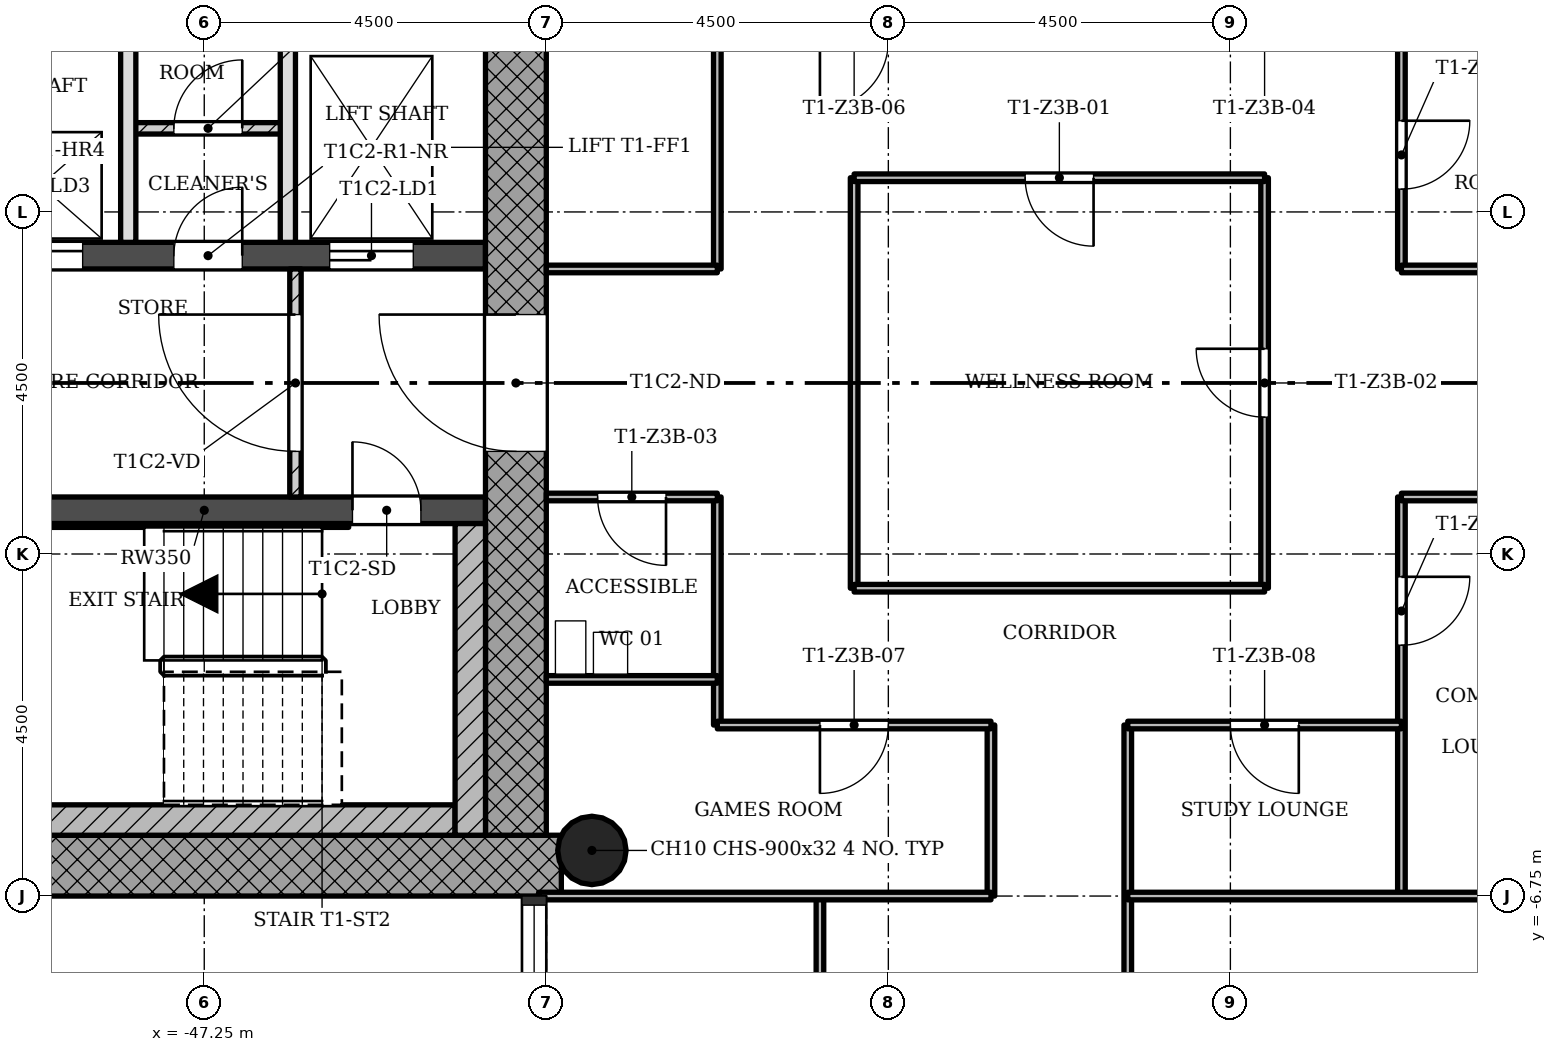
"""IFC4 building model, lengths in metres.
Left out: names, types, materials, properties, quantities, classifications, styles, units other than length and angle.
Written with IfcOpenShell. Run it as: python <this file> out.ifc"""

import sys

from ifc_helpers import new_model, si_unit, direction, frame, frame_2d, origin, origin_2d, place, context, subcontext, project, spatial, rectangle, hollow_circle, extrude, element, fill, save


model = new_model("IFC4")
c1 = context("Model", 3, precision=1e-05, world=origin(), true_north=direction((0.0, 1.0)))
c2 = subcontext(c1, "Body", "Model", "MODEL_VIEW")
j1 = project(units=[si_unit("LENGTHUNIT", "METRE"), si_unit("PLANEANGLEUNIT", "RADIAN")], contexts=[c1])
p1 = place(None, origin())
s1 = spatial("IfcSite", under=j1, at=p1, CompositionType="ELEMENT")
p2 = place(p1, origin())
s2 = spatial("IfcBuilding", under=s1, at=p2, CompositionType="ELEMENT")
p3 = place(p2, frame((0.0, 0.0, 143.9)))
s3 = spatial("IfcBuildingStorey", under=s2, at=p3, CompositionType="ELEMENT", Elevation=143.9)
p4 = place(p3, frame((-50.95, -6.35, 0.0), z_axis=(0.0, 0.0, 1.0), x_axis=(1.0, 0.0, 0.0)))
e1 = element("IfcWall", 1, at=p4, inside=s3, PredefinedType="SHEAR", context=c2, shape_type="SweptSolid", body=[
    extrude(rectangle(XDim=8.398, YDim=0.8, at=frame_2d((4.199, 0.0))), origin(), (0.0, 0.0, 1.0), 3.4),
])
p5 = place(p3, frame((-43.15, -5.95, 0.0), z_axis=(0.0, 0.0, 1.0), x_axis=(0.0, 1.0, 0.0)))
e2 = element("IfcWall", 2, at=p5, inside=s3, PredefinedType="SHEAR", context=c2, shape_type="SweptSolid", body=[
    extrude(rectangle(XDim=12.7, YDim=0.8, at=frame_2d((6.35, 0.0))), origin(), (0.0, 0.0, 1.0), 3.4),
])
p6 = place(p5, frame((5.05, 0.0, 0.0)))
e3 = element("IfcOpeningElement", 3, at=p6, cuts=e2, PredefinedType="OPENING", context=c2, shape_type="SweptSolid", body=[
    extrude(rectangle(XDim=1.8, YDim=2.1, at=frame_2d((0.9, 1.05))), frame((0.0, 0.41, 0.0), z_axis=(0.0, -1.0, 0.0), x_axis=(1.0, 0.0, 0.0)), (0.0, 0.0, 1.0), 0.82),
])
p7 = place(p3, frame((-50.95, -1.675, 0.0), z_axis=(0.0, 0.0, 1.0), x_axis=(1.0, 0.0, 0.0)))
e4 = element("IfcWall", 4, at=p7, inside=s3, PredefinedType="SHEAR", context=c2, shape_type="SweptSolid", body=[
    extrude(rectangle(XDim=7.4, YDim=0.35, at=frame_2d((3.7, 0.0))), origin(), (0.0, 0.0, 1.0), 3.4),
])
p8 = place(p7, frame((5.65, 0.0, 0.0)))
e5 = element("IfcOpeningElement", 5, at=p8, cuts=e4, PredefinedType="OPENING", context=c2, shape_type="SweptSolid", body=[
    extrude(rectangle(XDim=0.9, YDim=2.1, at=frame_2d((0.45, 1.05))), frame((0.0, 0.185, 0.0), z_axis=(0.0, -1.0, 0.0), x_axis=(1.0, 0.0, 0.0)), (0.0, 0.0, 1.0), 0.37),
])
p9 = place(p3, frame((-50.95, 1.675, 0.0), z_axis=(0.0, 0.0, 1.0), x_axis=(1.0, 0.0, 0.0)))
e6 = element("IfcWall", 6, at=p9, inside=s3, PredefinedType="SHEAR", context=c2, shape_type="SweptSolid", body=[
    extrude(rectangle(XDim=7.4, YDim=0.35, at=frame_2d((3.7, 0.0))), origin(), (0.0, 0.0, 1.0), 3.4),
])
p10 = place(p9, frame((5.35, 0.0, 0.0)))
e7 = element("IfcOpeningElement", 7, at=p10, cuts=e6, PredefinedType="OPENING", context=c2, shape_type="SweptSolid", body=[
    extrude(rectangle(XDim=1.1, YDim=2.1, at=frame_2d((0.55, 1.05))), frame((0.0, 0.185, 0.0), z_axis=(0.0, -1.0, 0.0), x_axis=(1.0, 0.0, 0.0)), (0.0, 0.0, 1.0), 0.37),
])
p11 = place(p9, frame((1.0, 0.0, 0.0)))
e8 = element("IfcOpeningElement", 8, at=p11, cuts=e6, PredefinedType="OPENING", context=c2, shape_type="SweptSolid", body=[
    extrude(rectangle(XDim=1.1, YDim=2.1, at=frame_2d((0.55, 1.05))), frame((0.0, 0.185, 0.0), z_axis=(0.0, -1.0, 0.0), x_axis=(1.0, 0.0, 0.0)), (0.0, 0.0, 1.0), 0.37),
])
p12 = place(p9, frame((3.3, 0.0, 0.0)))
e9 = element("IfcOpeningElement", 9, at=p12, cuts=e6, PredefinedType="OPENING", context=c2, shape_type="SweptSolid", body=[
    extrude(rectangle(XDim=0.9, YDim=2.1, at=frame_2d((0.45, 1.05))), frame((0.0, 0.185, 0.0), z_axis=(0.0, -1.0, 0.0), x_axis=(1.0, 0.0, 0.0)), (0.0, 0.0, 1.0), 0.37),
])
p13 = place(p3, frame((-42.15, -6.15, 0.0), z_axis=(0.0, 0.0, 1.0), x_axis=(1.0, 0.0, 0.0)))
e10 = element("IfcColumn", 10, at=p13, inside=s3, PredefinedType="COLUMN", context=c2, shape_type="SweptSolid", body=[
    extrude(hollow_circle(Radius=0.45, WallThickness=0.032, at=origin_2d()), origin(), (0.0, 0.0, 1.0), 3.4),
])
p14 = place(p3, frame((-46.05, 1.5, 0.0), z_axis=(0.0, 0.0, 1.0), x_axis=(0.0, -1.0, 0.0)))
e11 = element("IfcWall", 11, at=p14, inside=s3, PredefinedType="PARTITIONING", context=c2, shape_type="SweptSolid", body=[
    extrude(rectangle(XDim=3.0, YDim=0.15, at=frame_2d((1.5, 0.0))), origin(), (0.0, 0.0, 1.0), 3.0),
])
p15 = place(p14, frame((0.6, 0.0, 0.0)))
e12 = element("IfcOpeningElement", 12, at=p15, cuts=e11, PredefinedType="OPENING", context=c2, shape_type="SweptSolid", body=[
    extrude(rectangle(XDim=1.8, YDim=2.1, at=frame_2d((0.9, 1.05))), frame((0.0, 0.085, 0.0), z_axis=(0.0, -1.0, 0.0), x_axis=(1.0, 0.0, 0.0)), (0.0, 0.0, 1.0), 0.17),
])
for number, where, z_axis, x_axis in (
    (13, (-48.25, 5.95, 0.0), (0.0, 0.0, 1.0), (0.0, -1.0, 0.0)),
    (14, (-46.15, 5.95, 0.0), (0.0, 0.0, 1.0), (0.0, -1.0, 0.0)),
):
    element("IfcWall", number, at=place(p3, frame(where, z_axis=z_axis, x_axis=x_axis)), inside=s3, PredefinedType="SOLIDWALL", context=c2, shape_type="SweptSolid", body=[
        extrude(rectangle(XDim=4.1, YDim=0.2, at=frame_2d((2.05, 0.0))), origin(), (0.0, 0.0, 1.0), 3.0),
    ])
p16 = place(p3, frame((-46.15, 3.35, 0.0), z_axis=(0.0, 0.0, 1.0), x_axis=(-1.0, 0.0, 0.0)))
e15 = element("IfcWall", 15, at=p16, inside=s3, PredefinedType="PARTITIONING", context=c2, shape_type="SweptSolid", body=[
    extrude(rectangle(XDim=2.1, YDim=0.15, at=frame_2d((1.05, 0.0))), origin(), (0.0, 0.0, 1.0), 3.0),
])
p17 = place(p16, frame((0.6, 0.0, 0.0)))
e16 = element("IfcOpeningElement", 16, at=p17, cuts=e15, PredefinedType="OPENING", context=c2, shape_type="SweptSolid", body=[
    extrude(rectangle(XDim=0.9, YDim=2.1, at=frame_2d((0.45, 1.05))), frame((0.0, 0.085, 0.0), z_axis=(0.0, -1.0, 0.0), x_axis=(1.0, 0.0, 0.0)), (0.0, 0.0, 1.0), 0.17),
])
for number, where, z_axis, x_axis in (
    (17, (-40.5, -4.5, 0.0), (0.0, 0.0, 1.0), (0.0, 1.0, 0.0)),
    (18, (-40.5, 1.5, 0.0), (0.0, 0.0, 1.0), (0.0, 1.0, 0.0)),
):
    element("IfcWall", number, at=place(p3, frame(where, z_axis=z_axis, x_axis=x_axis)), inside=s3, PredefinedType="PARTITIONING", context=c2, shape_type="SweptSolid", body=[
        extrude(rectangle(XDim=3.0, YDim=0.1, at=frame_2d((1.5, 0.0))), origin(), (0.0, 0.0, 1.0), 3.0),
    ])
p18 = place(p3, frame((-39.15, -15.75, 0.0), z_axis=(0.0, 0.0, 1.0), x_axis=(0.0, 1.0, 0.0)))
e19 = element("IfcWall", 19, at=p18, inside=s3, PredefinedType="PARTITIONING", context=c2, shape_type="SweptSolid", body=[
    extrude(rectangle(XDim=9.0, YDim=0.1, at=frame_2d((4.5, 0.0))), origin(), (0.0, 0.0, 1.0), 3.0),
])
p19 = place(p18, frame((5.55, 0.0, 0.0)))
e20 = element("IfcOpeningElement", 20, at=p19, cuts=e19, PredefinedType="OPENING", context=c2, shape_type="SweptSolid", body=[
    extrude(rectangle(XDim=0.9, YDim=2.1, at=frame_2d((0.45, 1.05))), frame((0.0, 0.06, 0.0), z_axis=(0.0, -1.0, 0.0), x_axis=(1.0, 0.0, 0.0)), (0.0, 0.0, 1.0), 0.12),
])
p20 = place(p3, frame((-38.7, -2.7, 0.0), z_axis=(0.0, 0.0, 1.0), x_axis=(0.0, 1.0, 0.0)))
e21 = element("IfcWall", 21, at=p20, inside=s3, PredefinedType="PARTITIONING", context=c2, shape_type="SweptSolid", body=[
    extrude(rectangle(XDim=5.4, YDim=0.1, at=frame_2d((2.7, 0.0))), origin(), (0.0, 0.0, 1.0), 3.0),
])
p21 = place(p3, frame((-36.9, -6.75, 0.0), z_axis=(0.0, 0.0, 1.0), x_axis=(0.0, 1.0, 0.0)))
e22 = element("IfcWall", 22, at=p21, inside=s3, PredefinedType="PARTITIONING", context=c2, shape_type="SweptSolid", body=[
    extrude(rectangle(XDim=2.25, YDim=0.1, at=frame_2d((1.125, 0.0))), origin(), (0.0, 0.0, 1.0), 3.0),
])
p22 = place(p3, frame((-35.1, -8.55, 0.0), z_axis=(0.0, 0.0, 1.0), x_axis=(0.0, 1.0, 0.0)))
e23 = element("IfcWall", 23, at=p22, inside=s3, PredefinedType="PARTITIONING", context=c2, shape_type="SweptSolid", body=[
    extrude(rectangle(XDim=4.05, YDim=0.1, at=frame_2d((2.025, 0.0))), origin(), (0.0, 0.0, 1.0), 3.0),
])
p23 = place(p3, frame((-33.3, -2.7, 0.0), z_axis=(0.0, 0.0, 1.0), x_axis=(0.0, 1.0, 0.0)))
e24 = element("IfcWall", 24, at=p23, inside=s3, PredefinedType="PARTITIONING", context=c2, shape_type="SweptSolid", body=[
    extrude(rectangle(XDim=5.4, YDim=0.1, at=frame_2d((2.7, 0.0))), origin(), (0.0, 0.0, 1.0), 3.0),
])
p24 = place(p23, frame((2.25, 0.0, 0.0)))
e25 = element("IfcOpeningElement", 25, at=p24, cuts=e24, PredefinedType="OPENING", context=c2, shape_type="SweptSolid", body=[
    extrude(rectangle(XDim=0.9, YDim=2.1, at=frame_2d((0.45, 1.05))), frame((0.0, 0.06, 0.0), z_axis=(0.0, -1.0, 0.0), x_axis=(1.0, 0.0, 0.0)), (0.0, 0.0, 1.0), 0.12),
])
p25 = place(p3, frame((-31.5, -6.75, 0.0), z_axis=(0.0, 0.0, 1.0), x_axis=(0.0, 1.0, 0.0)))
e26 = element("IfcWall", 26, at=p25, inside=s3, PredefinedType="PARTITIONING", context=c2, shape_type="SweptSolid", body=[
    extrude(rectangle(XDim=5.25, YDim=0.1, at=frame_2d((2.625, 0.0))), origin(), (0.0, 0.0, 1.0), 3.0),
])
p26 = place(p25, frame((3.3, 0.0, 0.0)))
e27 = element("IfcOpeningElement", 27, at=p26, cuts=e26, PredefinedType="OPENING", context=c2, shape_type="SweptSolid", body=[
    extrude(rectangle(XDim=0.9, YDim=2.1, at=frame_2d((0.45, 1.05))), frame((0.0, 0.06, 0.0), z_axis=(0.0, -1.0, 0.0), x_axis=(1.0, 0.0, 0.0)), (0.0, 0.0, 1.0), 0.12),
])
p27 = place(p3, frame((-31.5, 1.5, 0.0), z_axis=(0.0, 0.0, 1.0), x_axis=(0.0, 1.0, 0.0)))
e28 = element("IfcWall", 28, at=p27, inside=s3, PredefinedType="PARTITIONING", context=c2, shape_type="SweptSolid", body=[
    extrude(rectangle(XDim=3.0, YDim=0.1, at=frame_2d((1.5, 0.0))), origin(), (0.0, 0.0, 1.0), 3.0),
])
p28 = place(p27, frame((1.05, 0.0, 0.0)))
e29 = element("IfcOpeningElement", 29, at=p28, cuts=e28, PredefinedType="OPENING", context=c2, shape_type="SweptSolid", body=[
    extrude(rectangle(XDim=0.9, YDim=2.1, at=frame_2d((0.45, 1.05))), frame((0.0, 0.06, 0.0), z_axis=(0.0, -1.0, 0.0), x_axis=(1.0, 0.0, 0.0)), (0.0, 0.0, 1.0), 0.12),
])
for number, where, z_axis, x_axis in (
    (30, (-42.85, -6.75, 0.0), (0.0, 0.0, 1.0), (1.0, 0.0, 0.0)),
    (31, (-35.1, -6.75, 0.0), (0.0, 0.0, 1.0), (1.0, 0.0, 0.0)),
):
    element("IfcWall", number, at=place(p3, frame(where, z_axis=z_axis, x_axis=x_axis)), inside=s3, PredefinedType="PARTITIONING", context=c2, shape_type="SweptSolid", body=[
        extrude(rectangle(XDim=5.95, YDim=0.1, at=frame_2d((2.975, 0.0))), origin(), (0.0, 0.0, 1.0), 3.0),
    ])
p29 = place(p3, frame((-40.5, -4.5, 0.0), z_axis=(0.0, 0.0, 1.0), x_axis=(1.0, 0.0, 0.0)))
e32 = element("IfcWall", 32, at=p29, inside=s3, PredefinedType="PARTITIONING", context=c2, shape_type="SweptSolid", body=[
    extrude(rectangle(XDim=3.6, YDim=0.1, at=frame_2d((1.8, 0.0))), origin(), (0.0, 0.0, 1.0), 3.0),
])
p30 = place(p29, frame((1.35, 0.0, 0.0)))
e33 = element("IfcOpeningElement", 33, at=p30, cuts=e32, PredefinedType="OPENING", context=c2, shape_type="SweptSolid", body=[
    extrude(rectangle(XDim=0.9, YDim=2.1, at=frame_2d((0.45, 1.05))), frame((0.0, 0.06, 0.0), z_axis=(0.0, -1.0, 0.0), x_axis=(1.0, 0.0, 0.0)), (0.0, 0.0, 1.0), 0.12),
])
p31 = place(p3, frame((-35.1, -4.5, 0.0), z_axis=(0.0, 0.0, 1.0), x_axis=(1.0, 0.0, 0.0)))
e34 = element("IfcWall", 34, at=p31, inside=s3, PredefinedType="PARTITIONING", context=c2, shape_type="SweptSolid", body=[
    extrude(rectangle(XDim=3.6, YDim=0.1, at=frame_2d((1.8, 0.0))), origin(), (0.0, 0.0, 1.0), 3.0),
])
p32 = place(p31, frame((1.35, 0.0, 0.0)))
e35 = element("IfcOpeningElement", 35, at=p32, cuts=e34, PredefinedType="OPENING", context=c2, shape_type="SweptSolid", body=[
    extrude(rectangle(XDim=0.9, YDim=2.1, at=frame_2d((0.45, 1.05))), frame((0.0, 0.06, 0.0), z_axis=(0.0, -1.0, 0.0), x_axis=(1.0, 0.0, 0.0)), (0.0, 0.0, 1.0), 0.12),
])
p33 = place(p3, frame((-42.75, -3.9, 0.0), z_axis=(0.0, 0.0, 1.0), x_axis=(1.0, 0.0, 0.0)))
e36 = element("IfcWall", 36, at=p33, inside=s3, PredefinedType="PARTITIONING", context=c2, shape_type="SweptSolid", body=[
    extrude(rectangle(XDim=2.25, YDim=0.1, at=frame_2d((1.125, 0.0))), origin(), (0.0, 0.0, 1.0), 3.0),
])
p34 = place(p3, frame((-38.7, -2.7, 0.0), z_axis=(0.0, 0.0, 1.0), x_axis=(1.0, 0.0, 0.0)))
e37 = element("IfcWall", 37, at=p34, inside=s3, PredefinedType="PARTITIONING", context=c2, shape_type="SweptSolid", body=[
    extrude(rectangle(XDim=5.4, YDim=0.1, at=frame_2d((2.7, 0.0))), origin(), (0.0, 0.0, 1.0), 3.0),
])
p35 = place(p3, frame((-42.75, -1.5, 0.0), z_axis=(0.0, 0.0, 1.0), x_axis=(1.0, 0.0, 0.0)))
e38 = element("IfcWall", 38, at=p35, inside=s3, PredefinedType="PARTITIONING", context=c2, shape_type="SweptSolid", body=[
    extrude(rectangle(XDim=2.25, YDim=0.1, at=frame_2d((1.125, 0.0))), origin(), (0.0, 0.0, 1.0), 3.0),
])
p36 = place(p35, frame((0.675, 0.0, 0.0)))
e39 = element("IfcOpeningElement", 39, at=p36, cuts=e38, PredefinedType="OPENING", context=c2, shape_type="SweptSolid", body=[
    extrude(rectangle(XDim=0.9, YDim=2.1, at=frame_2d((0.45, 1.05))), frame((0.0, 0.06, 0.0), z_axis=(0.0, -1.0, 0.0), x_axis=(1.0, 0.0, 0.0)), (0.0, 0.0, 1.0), 0.12),
])
for number, where, z_axis, x_axis in (
    (40, (-31.5, -1.5, 0.0), (0.0, 0.0, 1.0), (1.0, 0.0, 0.0)),
    (41, (-42.75, 1.5, 0.0), (0.0, 0.0, 1.0), (1.0, 0.0, 0.0)),
    (42, (-31.5, 1.5, 0.0), (0.0, 0.0, 1.0), (1.0, 0.0, 0.0)),
):
    element("IfcWall", number, at=place(p3, frame(where, z_axis=z_axis, x_axis=x_axis)), inside=s3, PredefinedType="PARTITIONING", context=c2, shape_type="SweptSolid", body=[
        extrude(rectangle(XDim=2.25, YDim=0.1, at=frame_2d((1.125, 0.0))), origin(), (0.0, 0.0, 1.0), 3.0),
    ])
p37 = place(p3, frame((-38.7, 2.7, 0.0), z_axis=(0.0, 0.0, 1.0), x_axis=(1.0, 0.0, 0.0)))
e43 = element("IfcWall", 43, at=p37, inside=s3, PredefinedType="PARTITIONING", context=c2, shape_type="SweptSolid", body=[
    extrude(rectangle(XDim=5.4, YDim=0.1, at=frame_2d((2.7, 0.0))), origin(), (0.0, 0.0, 1.0), 3.0),
])
p38 = place(p37, frame((2.25, 0.0, 0.0)))
e44 = element("IfcOpeningElement", 44, at=p38, cuts=e43, PredefinedType="OPENING", context=c2, shape_type="SweptSolid", body=[
    extrude(rectangle(XDim=0.9, YDim=2.1, at=frame_2d((0.45, 1.05))), frame((0.0, 0.06, 0.0), z_axis=(0.0, -1.0, 0.0), x_axis=(1.0, 0.0, 0.0)), (0.0, 0.0, 1.0), 0.12),
])
p39 = place(p3, frame((-43.95, -5.75, 0.0), z_axis=(0.0, 0.0, 1.0), x_axis=(-1.0, 0.0, 0.0)))
e45 = element("IfcWall", 45, at=p39, inside=s3, PredefinedType="SHEAR", context=c2, shape_type="SweptSolid", body=[
    extrude(rectangle(XDim=6.6, YDim=0.4, at=frame_2d((3.3, 0.0))), origin(), (0.0, 0.0, 1.0), 3.4),
])
p40 = place(p3, frame((-43.75, -1.85, 0.0), z_axis=(0.0, 0.0, 1.0), x_axis=(0.0, -1.0, 0.0)))
e46 = element("IfcWall", 46, at=p40, inside=s3, PredefinedType="SHEAR", context=c2, shape_type="SweptSolid", body=[
    extrude(rectangle(XDim=4.1, YDim=0.4, at=frame_2d((2.05, 0.0))), origin(), (0.0, 0.0, 1.0), 3.4),
])
p41 = place(p3, frame((-45.35, -1.875, 0.0), z_axis=(0.0, 0.0, 1.0), x_axis=(-1.0, 0.0, 0.0)))
e47 = element("IfcWall", 47, at=p41, inside=s3, PredefinedType="SHEAR", context=c2, shape_type="SweptSolid", body=[
    extrude(rectangle(XDim=5.2, YDim=0.05, at=frame_2d((2.6, 0.0))), origin(), (0.0, 0.0, 1.0), 3.4),
])
p42 = place(p15, origin())
e48 = element("IfcDoor", 48, at=p42, inside=s3, OperationType="SINGLE_SWING_LEFT", PredefinedType="DOOR", context=c2, shape_type="SweptSolid", body=[
    extrude(rectangle(XDim=1.8, YDim=2.1, at=frame_2d((0.9, 1.05))), frame((0.0, 0.025, 0.0), z_axis=(0.0, -1.0, 0.0), x_axis=(1.0, 0.0, 0.0)), (0.0, 0.0, 1.0), 0.05),
])
fill(e12, e48)
p43 = place(p17, origin())
e49 = element("IfcDoor", 49, at=p43, inside=s3, OperationType="SINGLE_SWING_LEFT", PredefinedType="DOOR", context=c2, shape_type="SweptSolid", body=[
    extrude(rectangle(XDim=0.9, YDim=2.1, at=frame_2d((0.45, 1.05))), frame((0.0, 0.025, 0.0), z_axis=(0.0, -1.0, 0.0), x_axis=(1.0, 0.0, 0.0)), (0.0, 0.0, 1.0), 0.05),
])
fill(e16, e49)
p44 = place(p38, origin())
e50 = element("IfcDoor", 50, at=p44, inside=s3, OperationType="SINGLE_SWING_RIGHT", PredefinedType="DOOR", context=c2, shape_type="SweptSolid", body=[
    extrude(rectangle(XDim=0.9, YDim=2.1, at=frame_2d((0.45, 1.05))), frame((0.0, 0.025, 0.0), z_axis=(0.0, -1.0, 0.0), x_axis=(1.0, 0.0, 0.0)), (0.0, 0.0, 1.0), 0.05),
])
fill(e44, e50)
p45 = place(p24, origin())
e51 = element("IfcDoor", 51, at=p45, inside=s3, OperationType="SINGLE_SWING_LEFT", PredefinedType="DOOR", context=c2, shape_type="SweptSolid", body=[
    extrude(rectangle(XDim=0.9, YDim=2.1, at=frame_2d((0.45, 1.05))), frame((0.0, 0.025, 0.0), z_axis=(0.0, -1.0, 0.0), x_axis=(1.0, 0.0, 0.0)), (0.0, 0.0, 1.0), 0.05),
])
fill(e25, e51)
p46 = place(p36, origin())
e52 = element("IfcDoor", 52, at=p46, inside=s3, OperationType="SINGLE_SWING_RIGHT", PredefinedType="DOOR", context=c2, shape_type="SweptSolid", body=[
    extrude(rectangle(XDim=0.9, YDim=2.1, at=frame_2d((0.45, 1.05))), frame((0.0, 0.025, 0.0), z_axis=(0.0, -1.0, 0.0), x_axis=(1.0, 0.0, 0.0)), (0.0, 0.0, 1.0), 0.05),
])
fill(e39, e52)
p47 = place(p28, origin())
e53 = element("IfcDoor", 53, at=p47, inside=s3, OperationType="SINGLE_SWING_RIGHT", PredefinedType="DOOR", context=c2, shape_type="SweptSolid", body=[
    extrude(rectangle(XDim=0.9, YDim=2.1, at=frame_2d((0.45, 1.05))), frame((0.0, 0.025, 0.0), z_axis=(0.0, -1.0, 0.0), x_axis=(1.0, 0.0, 0.0)), (0.0, 0.0, 1.0), 0.05),
])
fill(e29, e53)
p48 = place(p30, origin())
e54 = element("IfcDoor", 54, at=p48, inside=s3, OperationType="SINGLE_SWING_LEFT", PredefinedType="DOOR", context=c2, shape_type="SweptSolid", body=[
    extrude(rectangle(XDim=0.9, YDim=2.1, at=frame_2d((0.45, 1.05))), frame((0.0, 0.025, 0.0), z_axis=(0.0, -1.0, 0.0), x_axis=(1.0, 0.0, 0.0)), (0.0, 0.0, 1.0), 0.05),
])
fill(e33, e54)
p49 = place(p32, origin())
e55 = element("IfcDoor", 55, at=p49, inside=s3, OperationType="SINGLE_SWING_RIGHT", PredefinedType="DOOR", context=c2, shape_type="SweptSolid", body=[
    extrude(rectangle(XDim=0.9, YDim=2.1, at=frame_2d((0.45, 1.05))), frame((0.0, 0.025, 0.0), z_axis=(0.0, -1.0, 0.0), x_axis=(1.0, 0.0, 0.0)), (0.0, 0.0, 1.0), 0.05),
])
fill(e35, e55)
p50 = place(p26, origin())
e56 = element("IfcDoor", 56, at=p50, inside=s3, OperationType="SINGLE_SWING_RIGHT", PredefinedType="DOOR", context=c2, shape_type="SweptSolid", body=[
    extrude(rectangle(XDim=0.9, YDim=2.1, at=frame_2d((0.45, 1.05))), frame((0.0, 0.025, 0.0), z_axis=(0.0, -1.0, 0.0), x_axis=(1.0, 0.0, 0.0)), (0.0, 0.0, 1.0), 0.05),
])
fill(e27, e56)
p51 = place(p8, origin())
e57 = element("IfcDoor", 57, at=p51, inside=s3, OperationType="SINGLE_SWING_RIGHT", PredefinedType="DOOR", context=c2, shape_type="SweptSolid", body=[
    extrude(rectangle(XDim=0.9, YDim=2.1, at=frame_2d((0.45, 1.05))), frame((0.0, 0.025, 0.0), z_axis=(0.0, -1.0, 0.0), x_axis=(1.0, 0.0, 0.0)), (0.0, 0.0, 1.0), 0.05),
])
fill(e5, e57)
p52 = place(p10, origin())
e58 = element("IfcDoor", 58, at=p52, inside=s3, OperationType="SLIDING_TO_LEFT", PredefinedType="DOOR", context=c2, shape_type="SweptSolid", body=[
    extrude(rectangle(XDim=1.1, YDim=2.1, at=frame_2d((0.55, 1.05))), frame((0.0, 0.025, 0.0), z_axis=(0.0, -1.0, 0.0), x_axis=(1.0, 0.0, 0.0)), (0.0, 0.0, 1.0), 0.05),
])
fill(e7, e58)
p53 = place(p11, origin())
e59 = element("IfcDoor", 59, at=p53, inside=s3, OperationType="SLIDING_TO_LEFT", PredefinedType="DOOR", context=c2, shape_type="SweptSolid", body=[
    extrude(rectangle(XDim=1.1, YDim=2.1, at=frame_2d((0.55, 1.05))), frame((0.0, 0.025, 0.0), z_axis=(0.0, -1.0, 0.0), x_axis=(1.0, 0.0, 0.0)), (0.0, 0.0, 1.0), 0.05),
])
fill(e8, e59)
p54 = place(p12, origin())
e60 = element("IfcDoor", 60, at=p54, inside=s3, OperationType="SINGLE_SWING_LEFT", PredefinedType="DOOR", context=c2, shape_type="SweptSolid", body=[
    extrude(rectangle(XDim=0.9, YDim=2.1, at=frame_2d((0.45, 1.05))), frame((0.0, 0.025, 0.0), z_axis=(0.0, -1.0, 0.0), x_axis=(1.0, 0.0, 0.0)), (0.0, 0.0, 1.0), 0.05),
])
fill(e9, e60)
p55 = place(p6, origin())
e61 = element("IfcDoor", 61, at=p55, inside=s3, OperationType="SINGLE_SWING_LEFT", PredefinedType="DOOR", context=c2, shape_type="SweptSolid", body=[
    extrude(rectangle(XDim=1.8, YDim=2.1, at=frame_2d((0.9, 1.05))), frame((0.0, 0.025, 0.0), z_axis=(0.0, -1.0, 0.0), x_axis=(1.0, 0.0, 0.0)), (0.0, 0.0, 1.0), 0.05),
])
fill(e3, e61)
save(model, sys.argv[1])
